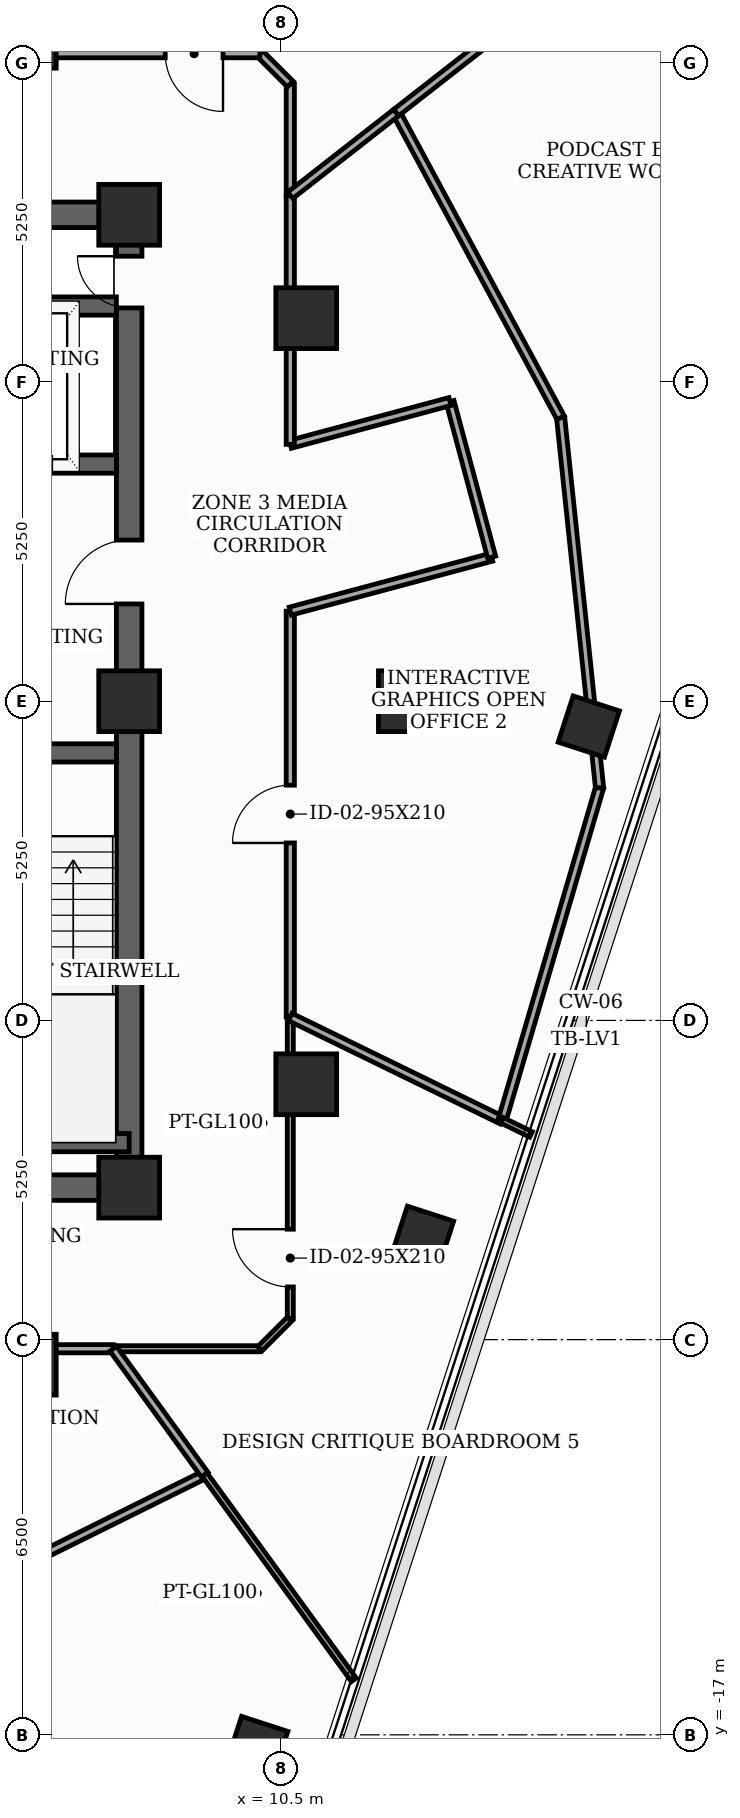
"""IFC4 building model, lengths in metres.
Left out: names, types, materials, properties, quantities, classifications, styles, units other than length and angle.
Written with IfcOpenShell. Run it as: python <this file> out.ifc"""

import sys

from ifc_helpers import new_model, si_unit, direction, frame, frame_2d, origin, origin_2d, place, context, subcontext, project, spatial, rectangle, extrude, element, fill, save


model = new_model("IFC4")
c1 = context("Model", 3, precision=1e-05, world=origin(), true_north=direction((0.0, 1.0)))
c2 = subcontext(c1, "Body", "Model", "MODEL_VIEW")
j1 = project(units=[si_unit("LENGTHUNIT", "METRE"), si_unit("PLANEANGLEUNIT", "RADIAN")], contexts=[c1])
p1 = place(None, origin())
s1 = spatial("IfcSite", under=j1, at=p1, CompositionType="ELEMENT")
p2 = place(p1, origin())
s2 = spatial("IfcBuilding", under=s1, at=p2, CompositionType="ELEMENT")
p3 = place(p2, frame((0.0, 0.0, 298.0)))
s3 = spatial("IfcBuildingStorey", under=s2, at=p3, CompositionType="ELEMENT", Elevation=298.0)
for number, where, z_axis, x_axis in (
    (1, (8.0, -8.0, 0.0), (0.0, 0.0, 1.0), (1.0, 0.0, 0.0)),
    (2, (8.0, 0.0, 0.0), (0.0, 0.0, 1.0), (1.0, 0.0, 0.0)),
    (3, (8.0, 8.0, 0.0), (0.0, 0.0, 1.0), (1.0, 0.0, 0.0)),
    (4, (12.6, 0.0, 0.0), (0.0, 0.0, 1.0), (1.0, 0.0, 0.0)),
    (5, (10.912, 6.3, 0.0), (0.0, 0.0, 1.0), (1.0, 0.0, 0.0)),
    (6, (6.3, 10.912, 0.0), (0.0, 0.0, 1.0), (1.0, 0.0, 0.0)),
    (7, (6.3, -10.912, 0.0), (0.0, 0.0, 1.0), (1.0, 0.0, 0.0)),
    (8, (10.912, -6.3, 0.0), (0.0, 0.0, 1.0), (1.0, 0.0, 0.0)),
):
    element("IfcColumn", number, at=place(p3, frame(where, z_axis=z_axis, x_axis=x_axis)), inside=s3, PredefinedType="COLUMN", context=c2, shape_type="SweptSolid", body=[
        extrude(rectangle(XDim=1.0, YDim=1.0, at=origin_2d()), origin(), (0.0, 0.0, 1.0), 3.7),
    ])
for number, where, z_axis, x_axis in (
    (9, (10.106, -17.201, 0.0), (0.0, 0.0, 1.0), (0.309, 0.951, 0.0)),
    (10, (12.833, -8.809, 0.0), (0.0, 0.0, 1.0), (0.309, 0.951, 0.0)),
    (11, (15.559, -0.417, 0.0), (0.0, 0.0, 1.0), (0.309, 0.951, 0.0)),
):
    element("IfcColumn", number, at=place(p3, frame(where, z_axis=z_axis, x_axis=x_axis)), inside=s3, PredefinedType="COLUMN", context=c2, shape_type="SweptSolid", body=[
        extrude(rectangle(XDim=0.8, YDim=0.8, at=origin_2d()), origin(), (0.0, 0.0, 1.0), 3.7),
    ])
p4 = place(p3, frame((8.0, -8.0, 0.0), z_axis=(0.0, 0.0, 1.0), x_axis=(0.0, 1.0, 0.0)))
e12 = element("IfcWall", 12, at=p4, inside=s3, PredefinedType="SHEAR", context=c2, shape_type="SweptSolid", body=[
    extrude(rectangle(XDim=16.0, YDim=0.42, at=frame_2d((8.0, 0.0))), origin(), (0.0, 0.0, 1.0), 3.5),
])
p5 = place(p4, frame((9.6, 0.0, 0.0)))
e13 = element("IfcOpeningElement", 13, at=p5, cuts=e12, PredefinedType="OPENING", context=c2, shape_type="SweptSolid", body=[
    extrude(rectangle(XDim=1.05, YDim=2.15, at=frame_2d((0.525, 1.075))), frame((0.0, 0.22, 0.0), z_axis=(0.0, -1.0, 0.0), x_axis=(1.0, 0.0, 0.0)), (0.0, 0.0, 1.0), 0.44),
])
p6 = place(p4, frame((14.469, 0.0, 0.0)))
e14 = element("IfcOpeningElement", 14, at=p6, cuts=e12, PredefinedType="OPENING", context=c2, shape_type="SweptSolid", body=[
    extrude(rectangle(XDim=0.85, YDim=2.02, at=frame_2d((0.425, 1.01))), frame((0.0, 0.22, 0.0), z_axis=(0.0, -1.0, 0.0), x_axis=(1.0, 0.0, 0.0)), (0.0, 0.0, 1.0), 0.44),
])
p7 = place(p3, frame((-8.0, -8.0, 0.0), z_axis=(0.0, 0.0, 1.0), x_axis=(1.0, 0.0, 0.0)))
e15 = element("IfcWall", 15, at=p7, inside=s3, PredefinedType="SHEAR", context=c2, shape_type="SweptSolid", body=[
    extrude(rectangle(XDim=16.0, YDim=0.42, at=frame_2d((8.0, 0.0))), origin(), (0.0, 0.0, 1.0), 3.5),
])
p8 = place(p7, frame((4.6, 0.0, 0.0)))
e16 = element("IfcOpeningElement", 16, at=p8, cuts=e15, PredefinedType="OPENING", context=c2, shape_type="SweptSolid", body=[
    extrude(rectangle(XDim=0.95, YDim=2.1, at=frame_2d((0.475, 1.05))), frame((0.0, 0.22, 0.0), z_axis=(0.0, -1.0, 0.0), x_axis=(1.0, 0.0, 0.0)), (0.0, 0.0, 1.0), 0.44),
])
p9 = place(p7, frame((7.52, 0.0, 0.0)))
e17 = element("IfcOpeningElement", 17, at=p9, cuts=e15, PredefinedType="OPENING", context=c2, shape_type="SweptSolid", body=[
    extrude(rectangle(XDim=0.95, YDim=2.1, at=frame_2d((0.475, 1.05))), frame((0.0, 0.22, 0.0), z_axis=(0.0, -1.0, 0.0), x_axis=(1.0, 0.0, 0.0)), (0.0, 0.0, 1.0), 0.44),
])
p10 = place(p7, frame((10.45, 0.0, 0.0)))
e18 = element("IfcOpeningElement", 18, at=p10, cuts=e15, PredefinedType="OPENING", context=c2, shape_type="SweptSolid", body=[
    extrude(rectangle(XDim=0.95, YDim=2.1, at=frame_2d((0.475, 1.05))), frame((0.0, 0.22, 0.0), z_axis=(0.0, -1.0, 0.0), x_axis=(1.0, 0.0, 0.0)), (0.0, 0.0, 1.0), 0.44),
])
p11 = place(p3, frame((-8.0, 8.0, 0.0), z_axis=(0.0, 0.0, 1.0), x_axis=(1.0, 0.0, 0.0)))
e19 = element("IfcWall", 19, at=p11, inside=s3, PredefinedType="SHEAR", context=c2, shape_type="SweptSolid", body=[
    extrude(rectangle(XDim=16.0, YDim=0.42, at=frame_2d((8.0, 0.0))), origin(), (0.0, 0.0, 1.0), 3.5),
])
p12 = place(p11, frame((7.1, 0.0, 0.0)))
e20 = element("IfcOpeningElement", 20, at=p12, cuts=e19, PredefinedType="OPENING", context=c2, shape_type="SweptSolid", body=[
    extrude(rectangle(XDim=1.8, YDim=2.15, at=frame_2d((0.9, 1.075))), frame((0.0, 0.22, 0.0), z_axis=(0.0, -1.0, 0.0), x_axis=(1.0, 0.0, 0.0)), (0.0, 0.0, 1.0), 0.44),
])
p13 = place(p3, frame((4.45, -0.85, 0.0), z_axis=(0.0, 0.0, 1.0), x_axis=(1.0, 0.0, 0.0)))
e21 = element("IfcWall", 21, at=p13, inside=s3, PredefinedType="SHEAR", context=c2, shape_type="SweptSolid", body=[
    extrude(rectangle(XDim=3.34, YDim=0.3, at=frame_2d((1.67, 0.0))), origin(), (0.0, 0.0, 1.0), 3.5),
])
p14 = place(p13, frame((0.65, 0.0, 0.0)))
e22 = element("IfcOpeningElement", 22, at=p14, cuts=e21, PredefinedType="OPENING", context=c2, shape_type="SweptSolid", body=[
    extrude(rectangle(XDim=1.05, YDim=2.15, at=frame_2d((0.525, 1.075))), frame((0.0, 0.16, 0.0), z_axis=(0.0, -1.0, 0.0), x_axis=(1.0, 0.0, 0.0)), (0.0, 0.0, 1.0), 0.32),
])
p15 = place(p3, frame((4.45, -7.26, 0.0), z_axis=(0.0, 0.0, 1.0), x_axis=(1.0, 0.0, 0.0)))
e23 = element("IfcWall", 23, at=p15, inside=s3, PredefinedType="SHEAR", context=c2, shape_type="SweptSolid", body=[
    extrude(rectangle(XDim=3.55, YDim=0.3, at=frame_2d((1.775, 0.0))), origin(), (0.0, 0.0, 1.0), 3.5),
])
p16 = place(p3, frame((4.45, 3.9, 0.0), z_axis=(0.0, 0.0, 1.0), x_axis=(1.0, 0.0, 0.0)))
e24 = element("IfcWall", 24, at=p16, inside=s3, PredefinedType="SHEAR", context=c2, shape_type="SweptSolid", body=[
    extrude(rectangle(XDim=3.34, YDim=0.3, at=frame_2d((1.67, 0.0))), origin(), (0.0, 0.0, 1.0), 3.5),
])
p17 = place(p16, frame((1.18, 0.0, 0.0)))
e25 = element("IfcOpeningElement", 25, at=p17, cuts=e24, PredefinedType="OPENING", context=c2, shape_type="SweptSolid", body=[
    extrude(rectangle(XDim=1.1, YDim=2.1, at=frame_2d((0.55, 1.05))), frame((0.0, 0.16, 0.0), z_axis=(0.0, -1.0, 0.0), x_axis=(1.0, 0.0, 0.0)), (0.0, 0.0, 1.0), 0.32),
])
p18 = place(p3, frame((4.45, 6.5, 0.0), z_axis=(0.0, 0.0, 1.0), x_axis=(1.0, 0.0, 0.0)))
e26 = element("IfcWall", 26, at=p18, inside=s3, PredefinedType="SHEAR", context=c2, shape_type="SweptSolid", body=[
    extrude(rectangle(XDim=3.34, YDim=0.3, at=frame_2d((1.67, 0.0))), origin(), (0.0, 0.0, 1.0), 3.5),
])
p19 = place(p3, frame((10.65, -5.194, 0.0), z_axis=(0.0, 0.0, 1.0), x_axis=(0.0, 1.0, 0.0)))
e27 = element("IfcWall", 27, at=p19, inside=s3, PredefinedType="PARTITIONING", context=c2, shape_type="SweptSolid", body=[
    extrude(rectangle(XDim=6.676, YDim=0.135, at=frame_2d((3.338, 0.0))), origin(), (0.0, 0.0, 1.0), 2.885),
])
p20 = place(p19, frame((2.863, 0.0, 0.0)))
e28 = element("IfcOpeningElement", 28, at=p20, cuts=e27, PredefinedType="OPENING", context=c2, shape_type="SweptSolid", body=[
    extrude(rectangle(XDim=0.95, YDim=2.1, at=frame_2d((0.475, 1.05))), frame((0.0, 0.077, 0.0), z_axis=(0.0, -1.0, 0.0), x_axis=(1.0, 0.0, 0.0)), (0.0, 0.0, 1.0), 0.155),
])
p21 = place(p3, frame((10.65, 1.482, 0.0), z_axis=(0.0, 0.0, 1.0), x_axis=(0.965961397105, 0.2586862565, 0.0)))
e29 = element("IfcWall", 29, at=p21, inside=s3, PredefinedType="PARTITIONING", context=c2, shape_type="SweptSolid", body=[
    extrude(rectangle(XDim=3.429, YDim=0.135, at=frame_2d((1.714, 0.0))), origin(), (0.0, 0.0, 1.0), 2.885),
])
p22 = place(p3, frame((13.962, 2.369, 0.0), z_axis=(0.0, 0.0, 1.0), x_axis=(-0.258413725385, 0.966034340245, 0.0)))
e30 = element("IfcWall", 30, at=p22, inside=s3, PredefinedType="PARTITIONING", context=c2, shape_type="SweptSolid", body=[
    extrude(rectangle(XDim=2.65, YDim=0.135, at=frame_2d((1.325, 0.0))), origin(), (0.0, 0.0, 1.0), 3.5),
])
p23 = place(p3, frame((13.277, 4.929, 0.0), z_axis=(0.0, 0.0, 1.0), x_axis=(-0.965934830229, -0.258785439601, 0.0)))
e31 = element("IfcWall", 31, at=p23, inside=s3, PredefinedType="PARTITIONING", context=c2, shape_type="SweptSolid", body=[
    extrude(rectangle(XDim=2.72, YDim=0.135, at=frame_2d((1.36, 0.0))), origin(), (0.0, 0.0, 1.0), 2.885),
])
p24 = place(p3, frame((10.65, 4.225, 0.0), z_axis=(0.0, 0.0, 1.0), x_axis=(0.0, 1.0, 0.0)))
e32 = element("IfcWall", 32, at=p24, inside=s3, PredefinedType="PARTITIONING", context=c2, shape_type="SweptSolid", body=[
    extrude(rectangle(XDim=4.096, YDim=0.135, at=frame_2d((2.048, 0.0))), origin(), (0.0, 0.0, 1.0), 2.885),
])
p25 = place(p3, frame((2.45, -10.65, 0.0), z_axis=(0.0, 0.0, 1.0), x_axis=(1.0, 0.0, 0.0)))
e33 = element("IfcWall", 33, at=p25, inside=s3, PredefinedType="PARTITIONING", context=c2, shape_type="SweptSolid", body=[
    extrude(rectangle(XDim=5.288, YDim=0.135, at=frame_2d((2.644, 0.0))), origin(), (0.0, 0.0, 1.0), 2.885),
])
p26 = place(p25, frame((0.583, 0.0, 0.0)))
e34 = element("IfcOpeningElement", 34, at=p26, cuts=e33, PredefinedType="OPENING", context=c2, shape_type="SweptSolid", body=[
    extrude(rectangle(XDim=0.95, YDim=2.1, at=frame_2d((0.475, 1.05))), frame((0.0, 0.077, 0.0), z_axis=(0.0, -1.0, 0.0), x_axis=(1.0, 0.0, 0.0)), (0.0, 0.0, 1.0), 0.155),
])
p27 = place(p3, frame((7.738, -10.65, 0.0), z_axis=(0.0, 0.0, 1.0), x_axis=(1.0, 0.0, 0.0)))
e35 = element("IfcWall", 35, at=p27, inside=s3, PredefinedType="MOVABLE", context=c2, shape_type="SweptSolid", body=[
    extrude(rectangle(XDim=2.412, YDim=0.1, at=frame_2d((1.206, 0.0))), origin(), (0.0, 0.0, 1.0), 3.5),
])
p28 = place(p3, frame((10.15, -10.65, 0.0), z_axis=(0.0, 0.0, 1.0), x_axis=(0.707106781187, 0.707106781187, 0.0)))
e36 = element("IfcWall", 36, at=p28, inside=s3, PredefinedType="MOVABLE", context=c2, shape_type="SweptSolid", body=[
    extrude(rectangle(XDim=0.707, YDim=0.1, at=frame_2d((0.354, 0.0))), origin(), (0.0, 0.0, 1.0), 3.5),
])
p29 = place(p3, frame((10.65, -10.15, 0.0), z_axis=(0.0, 0.0, 1.0), x_axis=(0.0, 1.0, 0.0)))
e37 = element("IfcWall", 37, at=p29, inside=s3, PredefinedType="MOVABLE", context=c2, shape_type="SweptSolid", body=[
    extrude(rectangle(XDim=4.956, YDim=0.1, at=frame_2d((2.478, 0.0))), origin(), (0.0, 0.0, 1.0), 2.885),
])
p30 = place(p29, frame((0.516, 0.0, 0.0)))
e38 = element("IfcOpeningElement", 38, at=p30, cuts=e37, PredefinedType="OPENING", context=c2, shape_type="SweptSolid", body=[
    extrude(rectangle(XDim=0.95, YDim=2.1, at=frame_2d((0.475, 1.05))), frame((0.0, 0.06, 0.0), z_axis=(0.0, -1.0, 0.0), x_axis=(1.0, 0.0, 0.0)), (0.0, 0.0, 1.0), 0.12),
])
p31 = place(p3, frame((10.65, 8.321, 0.0), z_axis=(0.0, 0.0, 1.0), x_axis=(0.0, 1.0, 0.0)))
e39 = element("IfcWall", 39, at=p31, inside=s3, PredefinedType="PARTITIONING", context=c2, shape_type="SweptSolid", body=[
    extrude(rectangle(XDim=1.829, YDim=0.135, at=frame_2d((0.915, 0.0))), origin(), (0.0, 0.0, 1.0), 3.5),
])
p32 = place(p3, frame((10.65, 10.15, 0.0), z_axis=(0.0, 0.0, 1.0), x_axis=(-0.707106781187, 0.707106781187, 0.0)))
e40 = element("IfcWall", 40, at=p32, inside=s3, PredefinedType="PARTITIONING", context=c2, shape_type="SweptSolid", body=[
    extrude(rectangle(XDim=0.707, YDim=0.135, at=frame_2d((0.354, 0.0))), origin(), (0.0, 0.0, 1.0), 3.5),
])
p33 = place(p3, frame((10.15, 10.65, 0.0), z_axis=(0.0, 0.0, 1.0), x_axis=(-1.0, 0.0, 0.0)))
e41 = element("IfcWall", 41, at=p33, inside=s3, PredefinedType="PARTITIONING", context=c2, shape_type="SweptSolid", body=[
    extrude(rectangle(XDim=5.408, YDim=0.135, at=frame_2d((2.704, 0.0))), origin(), (0.0, 0.0, 1.0), 2.885),
])
p34 = place(p33, frame((0.607, 0.0, 0.0)))
e42 = element("IfcOpeningElement", 42, at=p34, cuts=e41, PredefinedType="OPENING", context=c2, shape_type="SweptSolid", body=[
    extrude(rectangle(XDim=0.95, YDim=2.1, at=frame_2d((0.475, 1.05))), frame((0.0, 0.077, 0.0), z_axis=(0.0, -1.0, 0.0), x_axis=(1.0, 0.0, 0.0)), (0.0, 0.0, 1.0), 0.155),
])
p35 = place(p3, frame((10.65, -5.194, 0.0), z_axis=(0.0, 0.0, 1.0), x_axis=(0.898781159743, -0.438397567159, 0.0)))
e43 = element("IfcWall", 43, at=p35, inside=s3, PredefinedType="PARTITIONING", context=c2, shape_type="SweptSolid", body=[
    extrude(rectangle(XDim=3.875, YDim=0.135, at=frame_2d((1.938, 0.0))), origin(), (0.0, 0.0, 1.0), 2.885),
])
p36 = place(p3, frame((14.133, -6.893, 0.0), z_axis=(0.0, 0.0, 1.0), x_axis=(0.281231672123, 0.959639904649, 0.0)))
e44 = element("IfcWall", 44, at=p36, inside=s3, PredefinedType="PARTITIONING", context=c2, shape_type="SweptSolid", body=[
    extrude(rectangle(XDim=5.7, YDim=0.135, at=frame_2d((2.85, 0.0))), origin(), (0.0, 0.0, 1.0), 3.5),
])
p37 = place(p3, frame((15.736, -1.423, 0.0), z_axis=(0.0, 0.0, 1.0), x_axis=(-0.104601717472, 0.994514193313, 0.0)))
e45 = element("IfcWall", 45, at=p37, inside=s3, PredefinedType="PARTITIONING", context=c2, shape_type="SweptSolid", body=[
    extrude(rectangle(XDim=6.12, YDim=0.135, at=frame_2d((3.06, 0.0))), origin(), (0.0, 0.0, 1.0), 3.035),
])
p38 = place(p3, frame((15.096, 4.663, 0.0), z_axis=(0.0, 0.0, 1.0), x_axis=(-0.474498198469, 0.88025647379, 0.0)))
e46 = element("IfcWall", 46, at=p38, inside=s3, PredefinedType="PARTITIONING", context=c2, shape_type="SweptSolid", body=[
    extrude(rectangle(XDim=5.7, YDim=0.135, at=frame_2d((2.85, 0.0))), origin(), (0.0, 0.0, 1.0), 3.035),
])
p39 = place(p3, frame((12.391, 9.681, 0.0), z_axis=(0.0, 0.0, 1.0), x_axis=(-0.788124883644, -0.615515367624, 0.0)))
e47 = element("IfcWall", 47, at=p39, inside=s3, PredefinedType="PARTITIONING", context=c2, shape_type="SweptSolid", body=[
    extrude(rectangle(XDim=2.209, YDim=0.135, at=frame_2d((1.104, 0.0))), origin(), (0.0, 0.0, 1.0), 3.5),
])
p40 = place(p3, frame((4.134, -15.25, 0.0), z_axis=(0.0, 0.0, 1.0), x_axis=(0.896167979159, 0.443714945804, 0.0)))
e48 = element("IfcWall", 48, at=p40, inside=s3, PredefinedType="PARTITIONING", context=c2, shape_type="SweptSolid", body=[
    extrude(rectangle(XDim=5.7, YDim=0.135, at=frame_2d((2.85, 0.0))), origin(), (0.0, 0.0, 1.0), 3.035),
])
p41 = place(p3, frame((9.242, -12.721, 0.0), z_axis=(0.0, 0.0, 1.0), x_axis=(-0.58758169089, 0.80916485127, 0.0)))
e49 = element("IfcWall", 49, at=p41, inside=s3, PredefinedType="PARTITIONING", context=c2, shape_type="SweptSolid", body=[
    extrude(rectangle(XDim=2.56, YDim=0.135, at=frame_2d((1.28, 0.0))), origin(), (0.0, 0.0, 1.0), 3.5),
])
p42 = place(p3, frame((11.695, -16.096, 0.0), z_axis=(0.0, 0.0, 1.0), x_axis=(-0.587938546927, 0.808905597111, 0.0)))
e50 = element("IfcWall", 50, at=p42, inside=s3, PredefinedType="MOVABLE", context=c2, shape_type="SweptSolid", body=[
    extrude(rectangle(XDim=4.172, YDim=0.1, at=frame_2d((2.086, 0.0))), origin(), (0.0, 0.0, 1.0), 3.035),
])
p43 = place(p3, frame((14.609, -7.126, 0.0), z_axis=(0.0, 0.0, 1.0), x_axis=(-0.898533726223, 0.438904480313, 0.0)))
e51 = element("IfcWall", 51, at=p43, inside=s3, PredefinedType="MOVABLE", context=c2, shape_type="SweptSolid", body=[
    extrude(rectangle(XDim=0.53, YDim=0.1, at=frame_2d((0.265, 0.0))), origin(), (0.0, 0.0, 1.0), 3.5),
])
p44 = place(p3, frame((22.192, 17.338, 0.0), z_axis=(0.0, 0.0, 1.0), x_axis=(-0.788015446076, -0.615655469192, 0.0)))
e52 = element("IfcWall", 52, at=p44, inside=s3, PredefinedType="PARTITIONING", context=c2, shape_type="SweptSolid", body=[
    extrude(rectangle(XDim=12.438, YDim=0.135, at=frame_2d((6.219, 0.0))), origin(), (0.0, 0.0, 1.0), 3.035),
])
p45 = place(p44, frame((5.759, 0.0, 0.0)))
e53 = element("IfcOpeningElement", 53, at=p45, cuts=e52, PredefinedType="OPENING", context=c2, shape_type="SweptSolid", body=[
    extrude(rectangle(XDim=0.92, YDim=2.1, at=frame_2d((0.46, 1.05))), frame((0.0, 0.077, 0.0), z_axis=(0.0, -1.0, 0.0), x_axis=(1.0, 0.0, 0.0)), (0.0, 0.0, 1.0), 0.155),
])
p46 = place(p5, origin())
e54 = element("IfcDoor", 54, at=p46, inside=s3, OperationType="SINGLE_SWING_LEFT", PredefinedType="DOOR", context=c2, shape_type="SweptSolid", body=[
    extrude(rectangle(XDim=1.05, YDim=2.15, at=frame_2d((0.525, 1.075))), frame((0.0, 0.025, 0.0), z_axis=(0.0, -1.0, 0.0), x_axis=(1.0, 0.0, 0.0)), (0.0, 0.0, 1.0), 0.05),
])
fill(e13, e54)
p47 = place(p6, origin())
e55 = element("IfcDoor", 55, at=p47, inside=s3, OperationType="SINGLE_SWING_RIGHT", PredefinedType="TRAPDOOR", context=c2, shape_type="SweptSolid", body=[
    extrude(rectangle(XDim=0.85, YDim=2.02, at=frame_2d((0.425, 1.01))), frame((0.0, 0.025, 0.0), z_axis=(0.0, -1.0, 0.0), x_axis=(1.0, 0.0, 0.0)), (0.0, 0.0, 1.0), 0.05),
])
fill(e14, e55)
p48 = place(p20, origin())
e56 = element("IfcDoor", 56, at=p48, inside=s3, OperationType="SINGLE_SWING_LEFT", PredefinedType="DOOR", context=c2, shape_type="SweptSolid", body=[
    extrude(rectangle(XDim=0.95, YDim=2.1, at=frame_2d((0.475, 1.05))), frame((0.0, 0.025, 0.0), z_axis=(0.0, -1.0, 0.0), x_axis=(1.0, 0.0, 0.0)), (0.0, 0.0, 1.0), 0.05),
])
fill(e28, e56)
p49 = place(p30, origin())
e57 = element("IfcDoor", 57, at=p49, inside=s3, OperationType="SINGLE_SWING_RIGHT", PredefinedType="DOOR", context=c2, shape_type="SweptSolid", body=[
    extrude(rectangle(XDim=0.95, YDim=2.1, at=frame_2d((0.475, 1.05))), frame((0.0, 0.025, 0.0), z_axis=(0.0, -1.0, 0.0), x_axis=(1.0, 0.0, 0.0)), (0.0, 0.0, 1.0), 0.05),
])
fill(e38, e57)
p50 = place(p34, origin())
e58 = element("IfcDoor", 58, at=p50, inside=s3, OperationType="SINGLE_SWING_LEFT", PredefinedType="DOOR", context=c2, shape_type="SweptSolid", body=[
    extrude(rectangle(XDim=0.95, YDim=2.1, at=frame_2d((0.475, 1.05))), frame((0.0, 0.025, 0.0), z_axis=(0.0, -1.0, 0.0), x_axis=(1.0, 0.0, 0.0)), (0.0, 0.0, 1.0), 0.05),
])
fill(e42, e58)
save(model, sys.argv[1])
